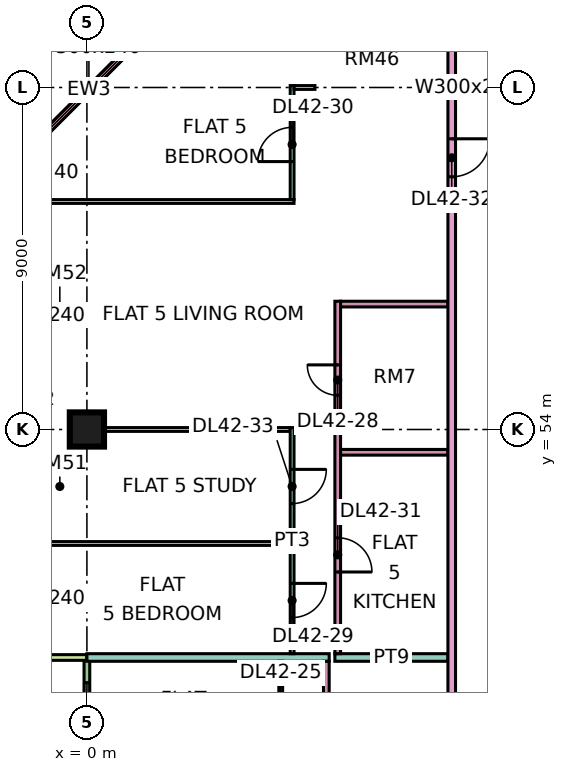
"""IFC4 building model, lengths in metres.
Left out: names, types, materials, properties, quantities, classifications, styles, units other than length and angle.
Written with IfcOpenShell. Run it as: python <this file> out.ifc"""

import sys

from ifc_helpers import new_model, si_unit, direction, frame, frame_2d, origin, origin_2d, place, context, subcontext, project, spatial, rectangle, extrude, element, fill, save


model = new_model("IFC4")
c1 = context("Model", 3, precision=1e-05, world=origin(), true_north=direction((0.0, 1.0)))
c2 = subcontext(c1, "Body", "Model", "MODEL_VIEW")
j1 = project(units=[si_unit("LENGTHUNIT", "METRE"), si_unit("PLANEANGLEUNIT", "RADIAN")], contexts=[c1])
p1 = place(None, origin())
s1 = spatial("IfcSite", under=j1, at=p1, CompositionType="ELEMENT")
p2 = place(p1, origin())
s2 = spatial("IfcBuilding", under=s1, at=p2, CompositionType="ELEMENT")
p3 = place(p2, frame((0.0, 0.0, 183.65)))
s3 = spatial("IfcBuildingStorey", under=s2, at=p3, CompositionType="ELEMENT", Elevation=183.65)
p4 = place(p3, frame((0.0, 54.0, 0.0), z_axis=(0.0, 0.0, 1.0), x_axis=(1.0, 0.0, 0.0)))
e1 = element("IfcColumn", 1, at=p4, inside=s3, PredefinedType="COLUMN", context=c2, shape_type="SweptSolid", body=[
    extrude(rectangle(XDim=0.9, YDim=0.9, at=origin_2d()), origin(), (0.0, 0.0, 1.0), 3.75),
])
p5 = place(p3, frame((1.553, 64.447, 0.0), z_axis=(0.0, 0.0, 1.0), x_axis=(-0.707106781187, -0.707106781187, 0.0)))
e2 = element("IfcWall", 2, at=p5, inside=s3, PredefinedType="SOLIDWALL", context=c2, shape_type="SweptSolid", body=[
    extrude(rectangle(XDim=4.243, YDim=0.15, at=frame_2d((2.121, 0.0))), origin(), (0.0, 0.0, 1.0), 3.35),
])
p6 = place(p5, frame((0.621, 0.0, 0.45)))
e3 = element("IfcOpeningElement", 3, at=p6, cuts=e2, PredefinedType="OPENING", context=c2, shape_type="SweptSolid", body=[
    extrude(rectangle(XDim=3.0, YDim=2.4, at=frame_2d((1.5, 1.2))), frame((0.0, 0.085, 0.0), z_axis=(0.0, -1.0, 0.0), x_axis=(1.0, 0.0, 0.0)), (0.0, 0.0, 1.0), 0.17),
])
p7 = place(p3, frame((0.0, 47.925, 0.0), z_axis=(0.0, 0.0, 1.0), x_axis=(0.0, -1.0, 0.0)))
e4 = element("IfcWall", 4, at=p7, inside=s3, PredefinedType="SOLIDWALL", context=c2, shape_type="SweptSolid", body=[
    extrude(rectangle(XDim=11.85, YDim=0.15, at=frame_2d((5.925, 0.0))), origin(), (0.0, 0.0, 1.0), 3.35),
])
p8 = place(p7, frame((0.587, 0.0, 0.45)))
e5 = element("IfcOpeningElement", 5, at=p8, cuts=e4, PredefinedType="OPENING", context=c2, shape_type="SweptSolid", body=[
    extrude(rectangle(XDim=1.2, YDim=2.4, at=frame_2d((0.6, 1.2))), frame((0.0, 0.085, 0.0), z_axis=(0.0, -1.0, 0.0), x_axis=(1.0, 0.0, 0.0)), (0.0, 0.0, 1.0), 0.17),
])
p9 = place(p7, frame((5.3, 0.0, 0.0)))
e6 = element("IfcOpeningElement", 6, at=p9, cuts=e4, PredefinedType="OPENING", context=c2, shape_type="SweptSolid", body=[
    extrude(rectangle(XDim=1.8, YDim=2.4, at=frame_2d((0.9, 1.2))), frame((0.0, 0.085, 0.0), z_axis=(0.0, -1.0, 0.0), x_axis=(1.0, 0.0, 0.0)), (0.0, 0.0, 1.0), 0.17),
])
p10 = place(p7, frame((9.55, 0.0, 0.45)))
e7 = element("IfcOpeningElement", 7, at=p10, cuts=e4, PredefinedType="OPENING", context=c2, shape_type="SweptSolid", body=[
    extrude(rectangle(XDim=1.2, YDim=2.4, at=frame_2d((0.6, 1.2))), frame((0.0, 0.085, 0.0), z_axis=(0.0, -1.0, 0.0), x_axis=(1.0, 0.0, 0.0)), (0.0, 0.0, 1.0), 0.17),
])
p11 = place(p3, frame((-1.5, 48.0, 0.0), z_axis=(0.0, 0.0, 1.0), x_axis=(1.0, 0.0, 0.0)))
e8 = element("IfcWall", 8, at=p11, inside=s3, PredefinedType="SOLIDWALL", context=c2, shape_type="SweptSolid", body=[
    extrude(rectangle(XDim=1.5, YDim=0.15, at=frame_2d((0.75, 0.0))), origin(), (0.0, 0.0, 1.0), 3.35),
])
p12 = place(p3, frame((0.0, 48.0, 0.0), z_axis=(0.0, 0.0, 1.0), x_axis=(1.0, 0.0, 0.0)))
e9 = element("IfcWall", 9, at=p12, inside=s3, PredefinedType="PARTITIONING", context=c2, shape_type="SweptSolid", body=[
    extrude(rectangle(XDim=6.375, YDim=0.2, at=frame_2d((3.188, 0.0))), origin(), (0.0, 0.0, 1.0), 3.35),
])
p13 = place(p3, frame((-1.35, 51.0, 0.0), z_axis=(0.0, 0.0, 1.0), x_axis=(1.0, 0.0, 0.0)))
e10 = element("IfcWall", 10, at=p13, inside=s3, PredefinedType="PARTITIONING", context=c2, shape_type="SweptSolid", body=[
    extrude(rectangle(XDim=6.7, YDim=0.1, at=frame_2d((3.35, 0.0))), origin(), (0.0, 0.0, 1.0), 3.35),
])
e11 = element("IfcWall", 11, at=p4, inside=s3, PredefinedType="PARTITIONING", context=c2, shape_type="SweptSolid", body=[
    extrude(rectangle(XDim=5.35, YDim=0.1, at=frame_2d((2.675, 0.0))), origin(), (0.0, 0.0, 1.0), 3.35),
])
p14 = place(p3, frame((-1.35, 60.0, 0.0), z_axis=(0.0, 0.0, 1.0), x_axis=(1.0, 0.0, 0.0)))
e12 = element("IfcWall", 12, at=p14, inside=s3, PredefinedType="PARTITIONING", context=c2, shape_type="SweptSolid", body=[
    extrude(rectangle(XDim=6.8, YDim=0.1, at=frame_2d((3.4, 0.0))), origin(), (0.0, 0.0, 1.0), 3.35),
])
p15 = place(p3, frame((5.1, 45.05, 0.0), z_axis=(0.0, 0.0, 1.0), x_axis=(0.0, 1.0, 0.0)))
e13 = element("IfcWall", 13, at=p15, inside=s3, PredefinedType="PARTITIONING", context=c2, shape_type="SweptSolid", body=[
    extrude(rectangle(XDim=2.85, YDim=0.1, at=frame_2d((1.425, 0.0))), origin(), (0.0, 0.0, 1.0), 3.35),
])
p16 = place(p15, frame((1.0, 0.0, 0.0)))
e14 = element("IfcOpeningElement", 14, at=p16, cuts=e13, PredefinedType="OPENING", context=c2, shape_type="SweptSolid", body=[
    extrude(rectangle(XDim=0.9, YDim=2.1, at=frame_2d((0.45, 1.05))), frame((0.0, 0.06, 0.0), z_axis=(0.0, -1.0, 0.0), x_axis=(1.0, 0.0, 0.0)), (0.0, 0.0, 1.0), 0.12),
])
p17 = place(p3, frame((5.4, 48.1, 0.0), z_axis=(0.0, 0.0, 1.0), x_axis=(0.0, 1.0, 0.0)))
e15 = element("IfcWall", 15, at=p17, inside=s3, PredefinedType="PARTITIONING", context=c2, shape_type="SweptSolid", body=[
    extrude(rectangle(XDim=5.95, YDim=0.1, at=frame_2d((2.975, 0.0))), origin(), (0.0, 0.0, 1.0), 3.35),
])
p18 = place(p17, frame((0.95, 0.0, 0.0)))
e16 = element("IfcOpeningElement", 16, at=p18, cuts=e15, PredefinedType="OPENING", context=c2, shape_type="SweptSolid", body=[
    extrude(rectangle(XDim=0.9, YDim=2.1, at=frame_2d((0.45, 1.05))), frame((0.0, 0.06, 0.0), z_axis=(0.0, -1.0, 0.0), x_axis=(1.0, 0.0, 0.0)), (0.0, 0.0, 1.0), 0.12),
])
p19 = place(p17, frame((3.95, 0.0, 0.0)))
e17 = element("IfcOpeningElement", 17, at=p19, cuts=e15, PredefinedType="OPENING", context=c2, shape_type="SweptSolid", body=[
    extrude(rectangle(XDim=0.9, YDim=2.1, at=frame_2d((0.45, 1.05))), frame((0.0, 0.06, 0.0), z_axis=(0.0, -1.0, 0.0), x_axis=(1.0, 0.0, 0.0)), (0.0, 0.0, 1.0), 0.12),
])
p20 = place(p3, frame((5.4, 60.05, 0.0), z_axis=(0.0, 0.0, 1.0), x_axis=(0.0, 1.0, 0.0)))
e18 = element("IfcWall", 18, at=p20, inside=s3, PredefinedType="PARTITIONING", context=c2, shape_type="SweptSolid", body=[
    extrude(rectangle(XDim=3.0, YDim=0.1, at=frame_2d((1.5, 0.0))), origin(), (0.0, 0.0, 1.0), 3.35),
])
p21 = place(p20, frame((1.0, 0.0, 0.0)))
e19 = element("IfcOpeningElement", 19, at=p21, cuts=e18, PredefinedType="OPENING", context=c2, shape_type="SweptSolid", body=[
    extrude(rectangle(XDim=0.9, YDim=2.1, at=frame_2d((0.45, 1.05))), frame((0.0, 0.06, 0.0), z_axis=(0.0, -1.0, 0.0), x_axis=(1.0, 0.0, 0.0)), (0.0, 0.0, 1.0), 0.12),
])
p22 = place(p3, frame((5.45, 63.0, 0.0), z_axis=(0.0, 0.0, 1.0), x_axis=(1.0, 0.0, 0.0)))
e20 = element("IfcWall", 20, at=p22, inside=s3, PredefinedType="PARTITIONING", context=c2, shape_type="SweptSolid", body=[
    extrude(rectangle(XDim=0.55, YDim=0.1, at=frame_2d((0.275, 0.0))), origin(), (0.0, 0.0, 1.0), 3.35),
])
p23 = place(p3, frame((6.3, 38.625, 0.0), z_axis=(0.0, 0.0, 1.0), x_axis=(0.0, 1.0, 0.0)))
e21 = element("IfcWall", 21, at=p23, inside=s3, PredefinedType="PARTITIONING", context=c2, shape_type="SweptSolid", body=[
    extrude(rectangle(XDim=9.275, YDim=0.15, at=frame_2d((4.637, 0.0))), origin(), (0.0, 0.0, 1.0), 3.35),
])
p24 = place(p23, frame((1.125, 0.0, 0.0)))
e22 = element("IfcOpeningElement", 22, at=p24, cuts=e21, PredefinedType="OPENING", context=c2, shape_type="SweptSolid", body=[
    extrude(rectangle(XDim=0.8, YDim=2.1, at=frame_2d((0.4, 1.05))), frame((0.0, 0.085, 0.0), z_axis=(0.0, -1.0, 0.0), x_axis=(1.0, 0.0, 0.0)), (0.0, 0.0, 1.0), 0.17),
])
p25 = place(p23, frame((5.775, 0.0, 0.0)))
e23 = element("IfcOpeningElement", 23, at=p25, cuts=e21, PredefinedType="OPENING", context=c2, shape_type="SweptSolid", body=[
    extrude(rectangle(XDim=0.9, YDim=2.1, at=frame_2d((0.45, 1.05))), frame((0.0, 0.085, 0.0), z_axis=(0.0, -1.0, 0.0), x_axis=(1.0, 0.0, 0.0)), (0.0, 0.0, 1.0), 0.17),
])
p26 = place(p3, frame((6.525, 48.0, 0.0), z_axis=(0.0, 0.0, 1.0), x_axis=(1.0, 0.0, 0.0)))
e24 = element("IfcWall", 24, at=p26, inside=s3, PredefinedType="PARTITIONING", context=c2, shape_type="SweptSolid", body=[
    extrude(rectangle(XDim=2.975, YDim=0.2, at=frame_2d((1.488, 0.0))), origin(), (0.0, 0.0, 1.0), 3.35),
])
p27 = place(p3, frame((6.6, 48.1, 0.0), z_axis=(0.0, 0.0, 1.0), x_axis=(0.0, 1.0, 0.0)))
e25 = element("IfcWall", 25, at=p27, inside=s3, PredefinedType="PARTITIONING", context=c2, shape_type="SweptSolid", body=[
    extrude(rectangle(XDim=9.275, YDim=0.15, at=frame_2d((4.637, 0.0))), origin(), (0.0, 0.0, 1.0), 3.35),
])
p28 = place(p27, frame((6.8, 0.0, 0.0)))
e26 = element("IfcOpeningElement", 26, at=p28, cuts=e25, PredefinedType="OPENING", context=c2, shape_type="SweptSolid", body=[
    extrude(rectangle(XDim=0.8, YDim=2.1, at=frame_2d((0.4, 1.05))), frame((0.0, 0.085, 0.0), z_axis=(0.0, -1.0, 0.0), x_axis=(1.0, 0.0, 0.0)), (0.0, 0.0, 1.0), 0.17),
])
p29 = place(p27, frame((2.15, 0.0, 0.0)))
e27 = element("IfcOpeningElement", 27, at=p29, cuts=e25, PredefinedType="OPENING", context=c2, shape_type="SweptSolid", body=[
    extrude(rectangle(XDim=0.9, YDim=2.1, at=frame_2d((0.45, 1.05))), frame((0.0, 0.085, 0.0), z_axis=(0.0, -1.0, 0.0), x_axis=(1.0, 0.0, 0.0)), (0.0, 0.0, 1.0), 0.17),
])
for number, where, z_axis, x_axis in (
    (28, (6.675, 53.4, 0.0), (0.0, 0.0, 1.0), (1.0, 0.0, 0.0)),
    (29, (6.675, 57.3, 0.0), (0.0, 0.0, 1.0), (1.0, 0.0, 0.0)),
):
    element("IfcWall", number, at=place(p3, frame(where, z_axis=z_axis, x_axis=x_axis)), inside=s3, PredefinedType="PARTITIONING", context=c2, shape_type="SweptSolid", body=[
        extrude(rectangle(XDim=2.825, YDim=0.15, at=frame_2d((1.413, 0.0))), origin(), (0.0, 0.0, 1.0), 3.35),
    ])
p30 = place(p3, frame((9.6, 20.0, 0.0), z_axis=(0.0, 0.0, 1.0), x_axis=(0.0, 1.0, 0.0)))
e30 = element("IfcWall", 30, at=p30, inside=s3, PredefinedType="PARTITIONING", context=c2, shape_type="SweptSolid", body=[
    extrude(rectangle(XDim=44.35, YDim=0.2, at=frame_2d((22.175, 0.0))), origin(), (0.0, 0.0, 1.0), 3.35),
])
p31 = place(p30, frame((16.8, 0.0, 0.0)))
e31 = element("IfcOpeningElement", 31, at=p31, cuts=e30, PredefinedType="OPENING", context=c2, shape_type="SweptSolid", body=[
    extrude(rectangle(XDim=1.0, YDim=2.1, at=frame_2d((0.5, 1.05))), frame((0.0, 0.11, 0.0), z_axis=(0.0, -1.0, 0.0), x_axis=(1.0, 0.0, 0.0)), (0.0, 0.0, 1.0), 0.22),
])
p32 = place(p30, frame((40.65, 0.0, 0.0)))
e32 = element("IfcOpeningElement", 32, at=p32, cuts=e30, PredefinedType="OPENING", context=c2, shape_type="SweptSolid", body=[
    extrude(rectangle(XDim=1.0, YDim=2.1, at=frame_2d((0.5, 1.05))), frame((0.0, 0.11, 0.0), z_axis=(0.0, -1.0, 0.0), x_axis=(1.0, 0.0, 0.0)), (0.0, 0.0, 1.0), 0.22),
])
p33 = place(p30, frame((0.6, 0.0, 0.0)))
e33 = element("IfcOpeningElement", 33, at=p33, cuts=e30, PredefinedType="OPENING", context=c2, shape_type="SweptSolid", body=[
    extrude(rectangle(XDim=1.2, YDim=2.1, at=frame_2d((0.6, 1.05))), frame((0.0, 0.11, 0.0), z_axis=(0.0, -1.0, 0.0), x_axis=(1.0, 0.0, 0.0)), (0.0, 0.0, 1.0), 0.22),
])
p34 = place(p30, frame((4.2, 0.0, 0.0)))
e34 = element("IfcOpeningElement", 34, at=p34, cuts=e30, PredefinedType="OPENING", context=c2, shape_type="SweptSolid", body=[
    extrude(rectangle(XDim=1.0, YDim=2.1, at=frame_2d((0.5, 1.05))), frame((0.0, 0.11, 0.0), z_axis=(0.0, -1.0, 0.0), x_axis=(1.0, 0.0, 0.0)), (0.0, 0.0, 1.0), 0.22),
])
p35 = place(p6, origin())
e35 = element("IfcWindow", 35, at=p35, inside=s3, PartitioningType="SINGLE_PANEL", PredefinedType="WINDOW", context=c2, shape_type="SweptSolid", body=[
    extrude(rectangle(XDim=3.0, YDim=2.4, at=frame_2d((1.5, 1.2))), frame((0.0, 0.03, 0.0), z_axis=(0.0, -1.0, 0.0), x_axis=(1.0, 0.0, 0.0)), (0.0, 0.0, 1.0), 0.06),
])
fill(e3, e35)
p36 = place(p8, origin())
e36 = element("IfcWindow", 36, at=p36, inside=s3, PartitioningType="SINGLE_PANEL", PredefinedType="WINDOW", context=c2, shape_type="SweptSolid", body=[
    extrude(rectangle(XDim=1.2, YDim=2.4, at=frame_2d((0.6, 1.2))), frame((0.0, 0.03, 0.0), z_axis=(0.0, -1.0, 0.0), x_axis=(1.0, 0.0, 0.0)), (0.0, 0.0, 1.0), 0.06),
])
fill(e5, e36)
p37 = place(p28, frame((0.8, 0.0, 0.0), z_axis=(0.0, 0.0, 1.0), x_axis=(-1.0, 0.0, 0.0)))
e37 = element("IfcDoor", 37, at=p37, inside=s3, OperationType="SINGLE_SWING_RIGHT", PredefinedType="DOOR", context=c2, shape_type="SweptSolid", body=[
    extrude(rectangle(XDim=0.8, YDim=2.1, at=frame_2d((0.4, 1.05))), frame((0.0, 0.025, 0.0), z_axis=(0.0, -1.0, 0.0), x_axis=(1.0, 0.0, 0.0)), (0.0, 0.0, 1.0), 0.05),
])
fill(e26, e37)
p38 = place(p18, origin())
e38 = element("IfcDoor", 38, at=p38, inside=s3, OperationType="SINGLE_SWING_RIGHT", PredefinedType="DOOR", context=c2, shape_type="SweptSolid", body=[
    extrude(rectangle(XDim=0.9, YDim=2.1, at=frame_2d((0.45, 1.05))), frame((0.0, 0.025, 0.0), z_axis=(0.0, -1.0, 0.0), x_axis=(1.0, 0.0, 0.0)), (0.0, 0.0, 1.0), 0.05),
])
fill(e16, e38)
p39 = place(p21, origin())
e39 = element("IfcDoor", 39, at=p39, inside=s3, OperationType="SINGLE_SWING_LEFT", PredefinedType="DOOR", context=c2, shape_type="SweptSolid", body=[
    extrude(rectangle(XDim=0.9, YDim=2.1, at=frame_2d((0.45, 1.05))), frame((0.0, 0.025, 0.0), z_axis=(0.0, -1.0, 0.0), x_axis=(1.0, 0.0, 0.0)), (0.0, 0.0, 1.0), 0.05),
])
fill(e19, e39)
p40 = place(p29, frame((0.9, 0.0, 0.0), z_axis=(0.0, 0.0, 1.0), x_axis=(-1.0, 0.0, 0.0)))
e40 = element("IfcDoor", 40, at=p40, inside=s3, OperationType="SINGLE_SWING_LEFT", PredefinedType="DOOR", context=c2, shape_type="SweptSolid", body=[
    extrude(rectangle(XDim=0.9, YDim=2.1, at=frame_2d((0.45, 1.05))), frame((0.0, 0.025, 0.0), z_axis=(0.0, -1.0, 0.0), x_axis=(1.0, 0.0, 0.0)), (0.0, 0.0, 1.0), 0.05),
])
fill(e27, e40)
p41 = place(p32, origin())
e41 = element("IfcDoor", 41, at=p41, inside=s3, OperationType="SINGLE_SWING_RIGHT", PredefinedType="DOOR", context=c2, shape_type="SweptSolid", body=[
    extrude(rectangle(XDim=1.0, YDim=2.1, at=frame_2d((0.5, 1.05))), frame((0.0, 0.025, 0.0), z_axis=(0.0, -1.0, 0.0), x_axis=(1.0, 0.0, 0.0)), (0.0, 0.0, 1.0), 0.05),
])
fill(e32, e41)
p42 = place(p19, origin())
e42 = element("IfcDoor", 42, at=p42, inside=s3, OperationType="SINGLE_SWING_RIGHT", PredefinedType="DOOR", context=c2, shape_type="SweptSolid", body=[
    extrude(rectangle(XDim=0.9, YDim=2.1, at=frame_2d((0.45, 1.05))), frame((0.0, 0.025, 0.0), z_axis=(0.0, -1.0, 0.0), x_axis=(1.0, 0.0, 0.0)), (0.0, 0.0, 1.0), 0.05),
])
fill(e17, e42)
save(model, sys.argv[1])
